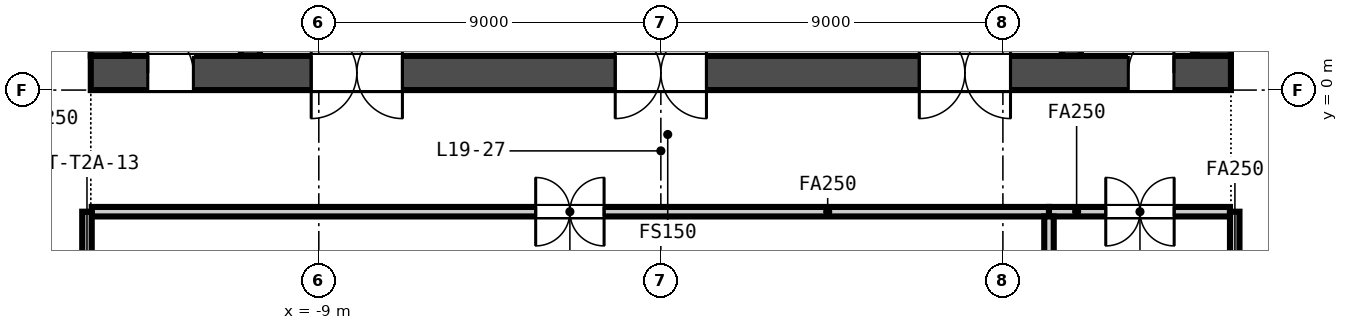
"""IFC4 building model, lengths in metres.
Left out: names, types, materials, properties, quantities, classifications, styles, units other than length and angle.
Written with IfcOpenShell. Run it as: python <this file> out.ifc"""

import sys

from ifc_helpers import new_model, si_unit, direction, frame, frame_2d, origin, place, context, subcontext, project, spatial, rectangle, extrude, element, fill, save


model = new_model("IFC4")
c1 = context("Model", 3, precision=1e-05, world=origin(), true_north=direction((0.0, 1.0)))
c2 = subcontext(c1, "Body", "Model", "MODEL_VIEW")
j1 = project(units=[si_unit("LENGTHUNIT", "METRE"), si_unit("PLANEANGLEUNIT", "RADIAN")], contexts=[c1])
p1 = place(None, origin())
s1 = spatial("IfcSite", under=j1, at=p1, CompositionType="ELEMENT")
p2 = place(p1, origin())
s2 = spatial("IfcBuilding", under=s1, at=p2, CompositionType="ELEMENT")
p3 = place(p2, frame((0.0, 0.0, 84.3)))
s3 = spatial("IfcBuildingStorey", under=s2, at=p3, CompositionType="ELEMENT", Elevation=84.3)
p4 = place(p3, frame((-15.0, 0.45, -0.15), z_axis=(0.0, 0.0, 1.0), x_axis=(1.0, 0.0, 0.0)))
e1 = element("IfcWall", 1, at=p4, inside=s3, PredefinedType="SOLIDWALL", context=c2, shape_type="SweptSolid", body=[
    extrude(rectangle(XDim=30.0, YDim=0.9, at=frame_2d((15.0, 0.0))), origin(), (0.0, 0.0, 1.0), 3.65),
])
p5 = place(p4, frame((5.8, 0.0, 0.15)))
e2 = element("IfcOpeningElement", 2, at=p5, cuts=e1, PredefinedType="OPENING", context=c2, shape_type="SweptSolid", body=[
    extrude(rectangle(XDim=2.4, YDim=2.4, at=frame_2d((1.2, 1.2))), frame((0.0, 0.46, 0.0), z_axis=(0.0, -1.0, 0.0), x_axis=(1.0, 0.0, 0.0)), (0.0, 0.0, 1.0), 0.92),
])
p6 = place(p4, frame((13.8, 0.0, 0.15)))
e3 = element("IfcOpeningElement", 3, at=p6, cuts=e1, PredefinedType="OPENING", context=c2, shape_type="SweptSolid", body=[
    extrude(rectangle(XDim=2.4, YDim=2.4, at=frame_2d((1.2, 1.2))), frame((0.0, 0.46, 0.0), z_axis=(0.0, -1.0, 0.0), x_axis=(1.0, 0.0, 0.0)), (0.0, 0.0, 1.0), 0.92),
])
p7 = place(p4, frame((21.8, 0.0, 0.15)))
e4 = element("IfcOpeningElement", 4, at=p7, cuts=e1, PredefinedType="OPENING", context=c2, shape_type="SweptSolid", body=[
    extrude(rectangle(XDim=2.4, YDim=2.4, at=frame_2d((1.2, 1.2))), frame((0.0, 0.46, 0.0), z_axis=(0.0, -1.0, 0.0), x_axis=(1.0, 0.0, 0.0)), (0.0, 0.0, 1.0), 0.92),
])
p8 = place(p4, frame((1.5, 0.0, 0.15)))
e5 = element("IfcOpeningElement", 5, at=p8, cuts=e1, PredefinedType="OPENING", context=c2, shape_type="SweptSolid", body=[
    extrude(rectangle(XDim=1.2, YDim=2.1, at=frame_2d((0.6, 1.05))), frame((0.0, 0.46, 0.0), z_axis=(0.0, -1.0, 0.0), x_axis=(1.0, 0.0, 0.0)), (0.0, 0.0, 1.0), 0.92),
])
p9 = place(p4, frame((27.3, 0.0, 0.15)))
e6 = element("IfcOpeningElement", 6, at=p9, cuts=e1, PredefinedType="OPENING", context=c2, shape_type="SweptSolid", body=[
    extrude(rectangle(XDim=1.2, YDim=2.1, at=frame_2d((0.6, 1.05))), frame((0.0, 0.46, 0.0), z_axis=(0.0, -1.0, 0.0), x_axis=(1.0, 0.0, 0.0)), (0.0, 0.0, 1.0), 0.92),
])
for number, where, z_axis, x_axis in (
    (7, (-14.55, 0.9, -0.15), (0.0, 0.0, 1.0), (0.0, 1.0, 0.0)),
    (8, (14.55, 0.9, -0.15), (0.0, 0.0, 1.0), (0.0, 1.0, 0.0)),
):
    element("IfcWall", number, at=place(p3, frame(where, z_axis=z_axis, x_axis=x_axis)), inside=s3, PredefinedType="SOLIDWALL", context=c2, shape_type="SweptSolid", body=[
        extrude(rectangle(XDim=13.2, YDim=0.9, at=frame_2d((6.6, 0.0))), origin(), (0.0, 0.0, 1.0), 3.65),
    ])
for number, where, z_axis, x_axis in (
    (9, (-10.8, 0.9, -0.15), (0.0, 0.0, 1.0), (0.0, 1.0, 0.0)),
    (10, (10.8, 0.9, -0.15), (0.0, 0.0, 1.0), (0.0, 1.0, 0.0)),
):
    element("IfcWall", number, at=place(p3, frame(where, z_axis=z_axis, x_axis=x_axis)), inside=s3, PredefinedType="SOLIDWALL", context=c2, shape_type="SweptSolid", body=[
        extrude(rectangle(XDim=13.2, YDim=0.5, at=frame_2d((6.6, 0.0))), origin(), (0.0, 0.0, 1.0), 3.65),
    ])
for number, where, z_axis, x_axis in (
    (11, (-14.05, 0.9, 0.0), (0.0, 0.0, 1.0), (0.0, 1.0, 0.0)),
    (12, (14.05, 0.9, 0.0), (0.0, 0.0, 1.0), (0.0, 1.0, 0.0)),
):
    element("IfcWall", number, at=place(p3, frame(where, z_axis=z_axis, x_axis=x_axis)), inside=s3, PredefinedType="SOLIDWALL", context=c2, shape_type="SweptSolid", body=[
        extrude(rectangle(XDim=13.2, YDim=0.1, at=frame_2d((6.6, 0.0))), origin(), (0.0, 0.0, 1.0), 3.5),
    ])
p10 = place(p3, frame((10.213, -3.2, 0.0), z_axis=(0.0, 0.0, 1.0), x_axis=(-1.0, 0.0, 0.0)))
e13 = element("IfcWall", 13, at=p10, inside=s3, PredefinedType="PARTITIONING", context=c2, shape_type="SweptSolid", body=[
    extrude(rectangle(XDim=25.188, YDim=0.25, at=frame_2d((12.594, 0.0))), origin(), (0.0, 0.0, 1.0), 2.741),
])
p11 = place(p10, frame((11.707, 0.0, 0.0)))
e14 = element("IfcOpeningElement", 14, at=p11, cuts=e13, PredefinedType="OPENING", context=c2, shape_type="SweptSolid", body=[
    extrude(rectangle(XDim=1.8, YDim=2.1, at=frame_2d((0.9, 1.05))), frame((0.0, 0.135, 0.0), z_axis=(0.0, -1.0, 0.0), x_axis=(1.0, 0.0, 0.0)), (0.0, 0.0, 1.0), 0.27),
])
p12 = place(p3, frame((14.975, -3.2, 0.0), z_axis=(0.0, 0.0, 1.0), x_axis=(-1.0, 0.0, 0.0)))
e15 = element("IfcWall", 15, at=p12, inside=s3, PredefinedType="PARTITIONING", context=c2, shape_type="SweptSolid", body=[
    extrude(rectangle(XDim=4.762, YDim=0.25, at=frame_2d((2.381, 0.0))), origin(), (0.0, 0.0, 1.0), 2.741),
])
p13 = place(p12, frame((1.469, 0.0, 0.0)))
e16 = element("IfcOpeningElement", 16, at=p13, cuts=e15, PredefinedType="OPENING", context=c2, shape_type="SweptSolid", body=[
    extrude(rectangle(XDim=1.8, YDim=2.1, at=frame_2d((0.9, 1.05))), frame((0.0, 0.135, 0.0), z_axis=(0.0, -1.0, 0.0), x_axis=(1.0, 0.0, 0.0)), (0.0, 0.0, 1.0), 0.27),
])
p14 = place(p3, frame((-15.1, -3.2, 0.0), z_axis=(0.0, 0.0, 1.0), x_axis=(0.0, -1.0, 0.0)))
e17 = element("IfcWall", 17, at=p14, inside=s3, PredefinedType="PARTITIONING", context=c2, shape_type="SweptSolid", body=[
    extrude(rectangle(XDim=15.875, YDim=0.25, at=frame_2d((7.938, 0.0))), origin(), (0.0, 0.0, 1.0), 2.741),
])
p15 = place(p14, frame((7.038, 0.0, 0.0)))
e18 = element("IfcOpeningElement", 18, at=p15, cuts=e17, PredefinedType="OPENING", context=c2, shape_type="SweptSolid", body=[
    extrude(rectangle(XDim=1.8, YDim=2.1, at=frame_2d((0.9, 1.05))), frame((0.0, 0.135, 0.0), z_axis=(0.0, -1.0, 0.0), x_axis=(1.0, 0.0, 0.0)), (0.0, 0.0, 1.0), 0.27),
])
p16 = place(p3, frame((10.213, -29.216, 0.0), z_axis=(0.0, 0.0, 1.0), x_axis=(0.0, 1.0, 0.0)))
e19 = element("IfcWall", 19, at=p16, inside=s3, PredefinedType="PARTITIONING", context=c2, shape_type="SweptSolid", body=[
    extrude(rectangle(XDim=25.891, YDim=0.25, at=frame_2d((12.946, 0.0))), origin(), (0.0, 0.0, 1.0), 2.741),
])
p17 = place(p3, frame((15.1, -15.075, 0.0), z_axis=(0.0, 0.0, 1.0), x_axis=(0.0, 1.0, 0.0)))
e20 = element("IfcWall", 20, at=p17, inside=s3, PredefinedType="PARTITIONING", context=c2, shape_type="SweptSolid", body=[
    extrude(rectangle(XDim=11.875, YDim=0.25, at=frame_2d((5.938, 0.0))), origin(), (0.0, 0.0, 1.0), 2.741),
])
p18 = place(p17, frame((5.038, 0.0, 0.0)))
e21 = element("IfcOpeningElement", 21, at=p18, cuts=e20, PredefinedType="OPENING", context=c2, shape_type="SweptSolid", body=[
    extrude(rectangle(XDim=1.8, YDim=2.1, at=frame_2d((0.9, 1.05))), frame((0.0, 0.135, 0.0), z_axis=(0.0, -1.0, 0.0), x_axis=(1.0, 0.0, 0.0)), (0.0, 0.0, 1.0), 0.27),
])
p19 = place(p5, origin())
e22 = element("IfcDoor", 22, at=p19, inside=s3, OperationType="DOUBLE_DOOR_DOUBLE_SWING", PredefinedType="DOOR", context=c2, shape_type="SweptSolid", body=[
    extrude(rectangle(XDim=2.4, YDim=2.4, at=frame_2d((1.2, 1.2))), frame((0.0, 0.025, 0.0), z_axis=(0.0, -1.0, 0.0), x_axis=(1.0, 0.0, 0.0)), (0.0, 0.0, 1.0), 0.05),
])
fill(e2, e22)
p20 = place(p6, origin())
e23 = element("IfcDoor", 23, at=p20, inside=s3, OperationType="DOUBLE_DOOR_DOUBLE_SWING", PredefinedType="DOOR", context=c2, shape_type="SweptSolid", body=[
    extrude(rectangle(XDim=2.4, YDim=2.4, at=frame_2d((1.2, 1.2))), frame((0.0, 0.025, 0.0), z_axis=(0.0, -1.0, 0.0), x_axis=(1.0, 0.0, 0.0)), (0.0, 0.0, 1.0), 0.05),
])
fill(e3, e23)
p21 = place(p7, origin())
e24 = element("IfcDoor", 24, at=p21, inside=s3, OperationType="DOUBLE_DOOR_DOUBLE_SWING", PredefinedType="DOOR", context=c2, shape_type="SweptSolid", body=[
    extrude(rectangle(XDim=2.4, YDim=2.4, at=frame_2d((1.2, 1.2))), frame((0.0, 0.025, 0.0), z_axis=(0.0, -1.0, 0.0), x_axis=(1.0, 0.0, 0.0)), (0.0, 0.0, 1.0), 0.05),
])
fill(e4, e24)
p22 = place(p8, origin())
e25 = element("IfcDoor", 25, at=p22, inside=s3, OperationType="SINGLE_SWING_LEFT", PredefinedType="DOOR", context=c2, shape_type="SweptSolid", body=[
    extrude(rectangle(XDim=1.2, YDim=2.1, at=frame_2d((0.6, 1.05))), frame((0.0, 0.025, 0.0), z_axis=(0.0, -1.0, 0.0), x_axis=(1.0, 0.0, 0.0)), (0.0, 0.0, 1.0), 0.05),
])
fill(e5, e25)
p23 = place(p9, origin())
e26 = element("IfcDoor", 26, at=p23, inside=s3, OperationType="SINGLE_SWING_RIGHT", PredefinedType="DOOR", context=c2, shape_type="SweptSolid", body=[
    extrude(rectangle(XDim=1.2, YDim=2.1, at=frame_2d((0.6, 1.05))), frame((0.0, 0.025, 0.0), z_axis=(0.0, -1.0, 0.0), x_axis=(1.0, 0.0, 0.0)), (0.0, 0.0, 1.0), 0.05),
])
fill(e6, e26)
p24 = place(p11, origin())
e27 = element("IfcDoor", 27, at=p24, inside=s3, OperationType="DOUBLE_DOOR_DOUBLE_SWING", PredefinedType="DOOR", context=c2, shape_type="SweptSolid", body=[
    extrude(rectangle(XDim=1.8, YDim=2.1, at=frame_2d((0.9, 1.05))), frame((0.0, 0.025, 0.0), z_axis=(0.0, -1.0, 0.0), x_axis=(1.0, 0.0, 0.0)), (0.0, 0.0, 1.0), 0.05),
])
fill(e14, e27)
p25 = place(p13, origin())
e28 = element("IfcDoor", 28, at=p25, inside=s3, OperationType="DOUBLE_DOOR_DOUBLE_SWING", PredefinedType="DOOR", context=c2, shape_type="SweptSolid", body=[
    extrude(rectangle(XDim=1.8, YDim=2.1, at=frame_2d((0.9, 1.05))), frame((0.0, 0.025, 0.0), z_axis=(0.0, -1.0, 0.0), x_axis=(1.0, 0.0, 0.0)), (0.0, 0.0, 1.0), 0.05),
])
fill(e16, e28)
save(model, sys.argv[1])
